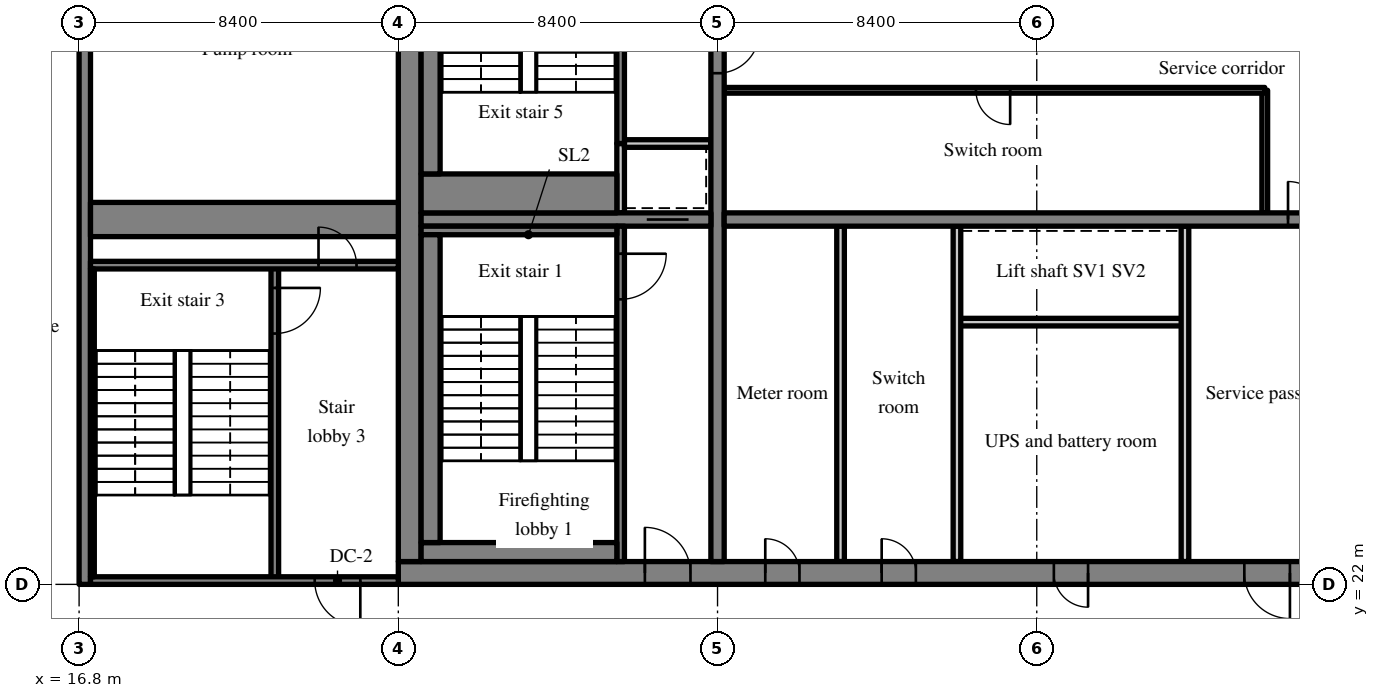
"""IFC4 building model, lengths in metres.
Left out: names, types, materials, properties, quantities, classifications, styles, units other than length and angle.
Written with IfcOpenShell. Run it as: python <this file> out.ifc"""

import sys

from ifc_helpers import new_model, si_unit, direction, frame, frame_2d, origin, place, context, subcontext, project, spatial, rectangle, extrude, source, transform, mapped, element, fill, save


model = new_model("IFC4")
c1 = context("Model", 3, precision=1e-05, world=origin(), true_north=direction((0.0, 1.0)))
c2 = subcontext(c1, "Body", "Model", "MODEL_VIEW")
j1 = project(units=[si_unit("LENGTHUNIT", "METRE"), si_unit("PLANEANGLEUNIT", "RADIAN")], contexts=[c1])
p1 = place(None, origin())
s1 = spatial("IfcSite", under=j1, at=p1, CompositionType="ELEMENT")
p2 = place(p1, origin())
s2 = spatial("IfcBuilding", under=s1, at=p2, CompositionType="ELEMENT")
p3 = place(p2, frame((0.0, 0.0, 264.7)))
s3 = spatial("IfcBuildingStorey", under=s2, at=p3, CompositionType="ELEMENT", Elevation=264.7)
m1 = source(origin(), c2, "Body", "SweptSolid", [
    extrude(rectangle(XDim=50.4, YDim=0.6, at=frame_2d((25.2, 0.0))), origin(), (0.0, 0.0, 1.0), 5.12),
])
p4 = place(p3, frame((25.2, 22.3, 0.0), z_axis=(0.0, 0.0, 1.0), x_axis=(1.0, 0.0, 0.0)))
e1 = element("IfcWall", 1, at=p4, inside=s3, PredefinedType="SHEAR", context=c2, shape_type="MappedRepresentation", body=[
    mapped(m1, transform((0.0, 0.0, 0.0), scale=1.0)),
])
m2 = source(origin(), c2, "Body", "SweptSolid", [
    extrude(rectangle(XDim=1.2, YDim=2.1, at=frame_2d((0.6, 1.05))), frame((0.0, 0.31, 0.0), z_axis=(0.0, -1.0, 0.0), x_axis=(1.0, 0.0, 0.0)), (0.0, 0.0, 1.0), 0.62),
])
p5 = place(p4, frame((22.262, 0.0, 0.0)))
e2 = element("IfcOpeningElement", 2, at=p5, cuts=e1, PredefinedType="OPENING", context=c2, shape_type="MappedRepresentation", body=[
    mapped(m2, transform((0.0, 0.0, 0.0), scale=1.0)),
])
m3 = source(origin(), c2, "Body", "SweptSolid", [
    extrude(rectangle(XDim=0.9, YDim=2.1, at=frame_2d((0.45, 1.05))), frame((0.0, 0.31, 0.0), z_axis=(0.0, -1.0, 0.0), x_axis=(1.0, 0.0, 0.0)), (0.0, 0.0, 1.0), 0.62),
])
p6 = place(p4, frame((17.25, 0.0, 0.0)))
e3 = element("IfcOpeningElement", 3, at=p6, cuts=e1, PredefinedType="OPENING", context=c2, shape_type="MappedRepresentation", body=[
    mapped(m3, transform((0.0, 0.0, 0.0), scale=1.0)),
])
p7 = place(p4, frame((9.656, 0.0, 0.0)))
e4 = element("IfcOpeningElement", 4, at=p7, cuts=e1, PredefinedType="OPENING", context=c2, shape_type="MappedRepresentation", body=[
    mapped(m3, transform((0.0, 0.0, 0.0), scale=1.0)),
])
p8 = place(p4, frame((12.719, 0.0, 0.0)))
e5 = element("IfcOpeningElement", 5, at=p8, cuts=e1, PredefinedType="OPENING", context=c2, shape_type="MappedRepresentation", body=[
    mapped(m3, transform((0.0, 0.0, 0.0), scale=1.0)),
])
m4 = source(origin(), c2, "Body", "SweptSolid", [
    extrude(rectangle(XDim=1.8, YDim=2.1, at=frame_2d((0.9, 1.05))), frame((0.0, 0.31, 0.0), z_axis=(0.0, -1.0, 0.0), x_axis=(1.0, 0.0, 0.0)), (0.0, 0.0, 1.0), 0.62),
])
p9 = place(p4, frame((32.7, 0.0, 0.0)))
e6 = element("IfcOpeningElement", 6, at=p9, cuts=e1, PredefinedType="OPENING", context=c2, shape_type="MappedRepresentation", body=[
    mapped(m4, transform((0.0, 0.0, 0.0), scale=1.0)),
])
p10 = place(p4, frame((6.488, 0.0, 0.0)))
e7 = element("IfcOpeningElement", 7, at=p10, cuts=e1, PredefinedType="OPENING", context=c2, shape_type="MappedRepresentation", body=[
    mapped(m2, transform((0.0, 0.0, 0.0), scale=1.0)),
])
p11 = place(p4, frame((47.925, 0.0, 0.0)))
e8 = element("IfcOpeningElement", 8, at=p11, cuts=e1, PredefinedType="OPENING", context=c2, shape_type="MappedRepresentation", body=[
    mapped(m2, transform((0.0, 0.0, 0.0), scale=1.0)),
])
m5 = source(origin(), c2, "Body", "SweptSolid", [
    extrude(rectangle(XDim=18.8, YDim=0.6, at=frame_2d((9.4, 0.0))), origin(), (0.0, 0.0, 1.0), 5.12),
])
p12 = place(p3, frame((25.5, 22.6, 0.0), z_axis=(0.0, 0.0, 1.0), x_axis=(0.0, 1.0, 0.0)))
e9 = element("IfcWall", 9, at=p12, inside=s3, PredefinedType="SHEAR", context=c2, shape_type="MappedRepresentation", body=[
    mapped(m5, transform((0.0, 0.0, 0.0), scale=1.0)),
])
p13 = place(p12, frame((16.6, 0.0, 0.0)))
e10 = element("IfcOpeningElement", 10, at=p13, cuts=e9, PredefinedType="OPENING", context=c2, shape_type="MappedRepresentation", body=[
    mapped(m2, transform((0.0, 0.0, 0.0), scale=1.0)),
])
m6 = source(origin(), c2, "Body", "SweptSolid", [
    extrude(rectangle(XDim=18.8, YDim=0.35, at=frame_2d((9.4, 0.0))), origin(), (0.0, 0.0, 1.0), 5.12),
])
p14 = place(p3, frame((33.6, 22.6, 0.0), z_axis=(0.0, 0.0, 1.0), x_axis=(0.0, 1.0, 0.0)))
e11 = element("IfcWall", 11, at=p14, inside=s3, PredefinedType="SHEAR", context=c2, shape_type="MappedRepresentation", body=[
    mapped(m6, transform((0.0, 0.0, 0.0), scale=1.0)),
])
m7 = source(origin(), c2, "Body", "SweptSolid", [
    extrude(rectangle(XDim=1.1, YDim=2.1, at=frame_2d((0.55, 1.05))), frame((0.0, 0.185, 0.0), z_axis=(0.0, -1.0, 0.0), x_axis=(1.0, 0.0, 0.0)), (0.0, 0.0, 1.0), 0.37),
])
p15 = place(p14, frame((12.85, 0.0, 0.0)))
e12 = element("IfcOpeningElement", 12, at=p15, cuts=e11, PredefinedType="OPENING", context=c2, shape_type="MappedRepresentation", body=[
    mapped(m7, transform((0.0, 0.0, 0.0), scale=1.0)),
])
m8 = source(origin(), c2, "Body", "SweptSolid", [
    extrude(rectangle(XDim=7.625, YDim=0.35, at=frame_2d((3.812, 0.0))), origin(), (0.0, 0.0, 1.0), 5.12),
])
p16 = place(p3, frame((25.8, 31.6, 0.0), z_axis=(0.0, 0.0, 1.0), x_axis=(1.0, 0.0, 0.0)))
e13 = element("IfcWall", 13, at=p16, inside=s3, PredefinedType="SHEAR", context=c2, shape_type="MappedRepresentation", body=[
    mapped(m8, transform((0.0, 0.0, 0.0), scale=1.0)),
])
p17 = place(p16, frame((5.938, 0.0, 0.0)))
e14 = element("IfcOpeningElement", 14, at=p17, cuts=e13, PredefinedType="OPENING", context=c2, shape_type="MappedRepresentation", body=[
    mapped(m7, transform((0.0, 0.0, 0.0), scale=1.0)),
])
m9 = source(origin(), c2, "Body", "SweptSolid", [
    extrude(rectangle(XDim=16.45, YDim=0.35, at=frame_2d((8.225, 0.0))), origin(), (0.0, 0.0, 1.0), 5.12),
])
p18 = place(p3, frame((33.775, 31.6, 0.0), z_axis=(0.0, 0.0, 1.0), x_axis=(1.0, 0.0, 0.0)))
e15 = element("IfcWall", 15, at=p18, inside=s3, PredefinedType="SHEAR", context=c2, shape_type="MappedRepresentation", body=[
    mapped(m9, transform((0.0, 0.0, 0.0), scale=1.0)),
])
m10 = source(origin(), c2, "Body", "SweptSolid", [
    extrude(rectangle(XDim=1.0, YDim=2.1, at=frame_2d((0.5, 1.05))), frame((0.0, 0.185, 0.0), z_axis=(0.0, -1.0, 0.0), x_axis=(1.0, 0.0, 0.0)), (0.0, 0.0, 1.0), 0.37),
])
p19 = place(p18, frame((14.837, 0.0, 0.0)))
e16 = element("IfcOpeningElement", 16, at=p19, cuts=e15, PredefinedType="OPENING", context=c2, shape_type="MappedRepresentation", body=[
    mapped(m10, transform((0.0, 0.0, 0.0), scale=1.0)),
])
m11 = source(origin(), c2, "Body", "SweptSolid", [
    extrude(rectangle(XDim=18.4, YDim=0.3, at=frame_2d((9.2, 0.0))), origin(), (0.0, 0.0, 1.0), 5.12),
])
p20 = place(p3, frame((16.95, 22.0, 0.0), z_axis=(0.0, 0.0, 1.0), x_axis=(0.0, 1.0, 0.0)))
e17 = element("IfcWall", 17, at=p20, inside=s3, PredefinedType="SHEAR", context=c2, shape_type="MappedRepresentation", body=[
    mapped(m11, transform((0.0, 0.0, 0.0), scale=1.0)),
])
m12 = source(origin(), c2, "Body", "SweptSolid", [
    extrude(rectangle(XDim=8.1, YDim=0.9, at=frame_2d((4.05, 0.0))), origin(), (0.0, 0.0, 1.0), 5.12),
])
p21 = place(p3, frame((17.1, 31.6, 0.0), z_axis=(0.0, 0.0, 1.0), x_axis=(1.0, 0.0, 0.0)))
e18 = element("IfcWall", 18, at=p21, inside=s3, PredefinedType="SHEAR", context=c2, shape_type="MappedRepresentation", body=[
    mapped(m12, transform((0.0, 0.0, 0.0), scale=1.0)),
])
m13 = source(origin(), c2, "Body", "SweptSolid", [
    extrude(rectangle(XDim=6.0, YDim=0.2, at=frame_2d((3.0, 0.0))), origin(), (0.0, 0.0, 1.0), 5.12),
])
p22 = place(p3, frame((39.9, 28.9, 0.0), z_axis=(0.0, 0.0, 1.0), x_axis=(1.0, 0.0, 0.0)))
e19 = element("IfcWall", 19, at=p22, inside=s3, PredefinedType="SOLIDWALL", context=c2, shape_type="MappedRepresentation", body=[
    mapped(m13, transform((0.0, 0.0, 0.0), scale=1.0)),
])
m14 = source(origin(), c2, "Body", "SweptSolid", [
    extrude(rectangle(XDim=8.825, YDim=0.2, at=frame_2d((4.413, 0.0))), origin(), (0.0, 0.0, 1.0), 5.12),
])
for number, where, z_axis, x_axis in (
    (20, (45.9, 22.6, 0.0), (0.0, 0.0, 1.0), (0.0, 1.0, 0.0)),
    (21, (39.9, 22.6, 0.0), (0.0, 0.0, 1.0), (0.0, 1.0, 0.0)),
    (22, (36.837, 22.6, 0.0), (0.0, 0.0, 1.0), (0.0, 1.0, 0.0)),
):
    element("IfcWall", number, at=place(p3, frame(where, z_axis=z_axis, x_axis=x_axis)), inside=s3, PredefinedType="PARTITIONING", context=c2, shape_type="MappedRepresentation", body=[
        mapped(m14, transform((0.0, 0.0, 0.0), scale=1.0)),
    ])
m15 = source(origin(), c2, "Body", "SweptSolid", [
    extrude(rectangle(XDim=3.225, YDim=0.15, at=frame_2d((1.613, 0.0))), origin(), (0.0, 0.0, 1.0), 5.12),
])
p23 = place(p3, frame((48.0, 31.775, 0.0), z_axis=(0.0, 0.0, 1.0), x_axis=(0.0, 1.0, 0.0)))
e23 = element("IfcWall", 23, at=p23, inside=s3, PredefinedType="PARTITIONING", context=c2, shape_type="MappedRepresentation", body=[
    mapped(m15, transform((0.0, 0.0, 0.0), scale=1.0)),
])
m16 = source(origin(), c2, "Body", "SweptSolid", [
    extrude(rectangle(XDim=14.225, YDim=0.15, at=frame_2d((7.113, 0.0))), origin(), (0.0, 0.0, 1.0), 5.12),
])
p24 = place(p3, frame((33.775, 35.0, 0.0), z_axis=(0.0, 0.0, 1.0), x_axis=(1.0, 0.0, 0.0)))
e24 = element("IfcWall", 24, at=p24, inside=s3, PredefinedType="PARTITIONING", context=c2, shape_type="MappedRepresentation", body=[
    mapped(m16, transform((0.0, 0.0, 0.0), scale=1.0)),
])
m17 = source(origin(), c2, "Body", "SweptSolid", [
    extrude(rectangle(XDim=0.9, YDim=2.1, at=frame_2d((0.45, 1.05))), frame((0.0, 0.085, 0.0), z_axis=(0.0, -1.0, 0.0), x_axis=(1.0, 0.0, 0.0)), (0.0, 0.0, 1.0), 0.17),
])
p25 = place(p24, frame((6.625, 0.0, 0.0)))
e25 = element("IfcOpeningElement", 25, at=p25, cuts=e24, PredefinedType="OPENING", context=c2, shape_type="MappedRepresentation", body=[
    mapped(m17, transform((0.0, 0.0, 0.0), scale=1.0)),
])
m18 = source(origin(), c2, "Body", "SweptSolid", [
    extrude(rectangle(XDim=8.825, YDim=0.2, at=frame_2d((4.413, 0.0))), origin(), (0.0, 0.0, 1.0), 5.12),
])
p26 = place(p3, frame((31.05, 22.6, 0.0), z_axis=(0.0, 0.0, 1.0), x_axis=(0.0, 1.0, 0.0)))
e26 = element("IfcWall", 26, at=p26, inside=s3, PredefinedType="SOLIDWALL", context=c2, shape_type="MappedRepresentation", body=[
    mapped(m18, transform((0.0, 0.0, 0.0), scale=1.0)),
])
m19 = source(origin(), c2, "Body", "SweptSolid", [
    extrude(rectangle(XDim=1.2, YDim=2.1, at=frame_2d((0.6, 1.05))), frame((0.0, 0.11, 0.0), z_axis=(0.0, -1.0, 0.0), x_axis=(1.0, 0.0, 0.0)), (0.0, 0.0, 1.0), 0.22),
])
p27 = place(p26, frame((6.9, 0.0, 0.0)))
e27 = element("IfcOpeningElement", 27, at=p27, cuts=e26, PredefinedType="OPENING", context=c2, shape_type="MappedRepresentation", body=[
    mapped(m19, transform((0.0, 0.0, 0.0), scale=1.0)),
])
m20 = source(origin(), c2, "Body", "SweptSolid", [
    extrude(rectangle(XDim=1.825, YDim=0.2, at=frame_2d((0.913, 0.0))), origin(), (0.0, 0.0, 1.0), 5.12),
])
p28 = place(p3, frame((31.05, 31.775, 0.0), z_axis=(0.0, 0.0, 1.0), x_axis=(0.0, 1.0, 0.0)))
e28 = element("IfcWall", 28, at=p28, inside=s3, PredefinedType="SOLIDWALL", context=c2, shape_type="MappedRepresentation", body=[
    mapped(m20, transform((0.0, 0.0, 0.0), scale=1.0)),
])
m21 = source(origin(), c2, "Body", "SweptSolid", [
    extrude(rectangle(XDim=2.275, YDim=0.2, at=frame_2d((1.138, 0.0))), origin(), (0.0, 0.0, 1.0), 5.12),
])
p29 = place(p3, frame((31.15, 33.6, 0.0), z_axis=(0.0, 0.0, 1.0), x_axis=(1.0, 0.0, 0.0)))
e29 = element("IfcWall", 29, at=p29, inside=s3, PredefinedType="SOLIDWALL", context=c2, shape_type="MappedRepresentation", body=[
    mapped(m21, transform((0.0, 0.0, 0.0), scale=1.0)),
])
m22 = source(origin(), c2, "Body", "SweptSolid", [
    extrude(rectangle(XDim=7.8, YDim=0.2, at=frame_2d((3.9, 0.0))), origin(), (0.0, 0.0, 1.0), 5.12),
])
p30 = place(p3, frame((31.05, 33.6, 0.0), z_axis=(0.0, 0.0, 1.0), x_axis=(0.0, 1.0, 0.0)))
e30 = element("IfcWall", 30, at=p30, inside=s3, PredefinedType="SOLIDWALL", context=c2, shape_type="MappedRepresentation", body=[
    mapped(m22, transform((0.0, 0.0, 0.0), scale=1.0)),
])
m23 = source(origin(), c2, "Body", "SweptSolid", [
    extrude(rectangle(XDim=1.8, YDim=2.1, at=frame_2d((0.9, 1.05))), frame((0.0, 0.11, 0.0), z_axis=(0.0, -1.0, 0.0), x_axis=(1.0, 0.0, 0.0)), (0.0, 0.0, 1.0), 0.22),
])
p31 = place(p30, frame((5.3, 0.0, 0.0)))
e31 = element("IfcOpeningElement", 31, at=p31, cuts=e30, PredefinedType="OPENING", context=c2, shape_type="MappedRepresentation", body=[
    mapped(m23, transform((0.0, 0.0, 0.0), scale=1.0)),
])
m24 = source(origin(), c2, "Body", "SweptSolid", [
    extrude(rectangle(XDim=8.3, YDim=0.2, at=frame_2d((4.15, 0.0))), origin(), (0.0, 0.0, 1.0), 5.12),
])
p32 = place(p3, frame((21.95, 22.1, 0.0), z_axis=(0.0, 0.0, 1.0), x_axis=(0.0, 1.0, 0.0)))
e32 = element("IfcWall", 32, at=p32, inside=s3, PredefinedType="SOLIDWALL", context=c2, shape_type="MappedRepresentation", body=[
    mapped(m24, transform((0.0, 0.0, 0.0), scale=1.0)),
])
p33 = place(p32, frame((6.5, 0.0, 0.0)))
e33 = element("IfcOpeningElement", 33, at=p33, cuts=e32, PredefinedType="OPENING", context=c2, shape_type="MappedRepresentation", body=[
    mapped(m19, transform((0.0, 0.0, 0.0), scale=1.0)),
])
m25 = source(origin(), c2, "Body", "SweptSolid", [
    extrude(rectangle(XDim=8.1, YDim=0.2, at=frame_2d((4.05, 0.0))), origin(), (0.0, 0.0, 1.0), 5.12),
])
p34 = place(p3, frame((17.1, 22.1, 0.0), z_axis=(0.0, 0.0, 1.0), x_axis=(1.0, 0.0, 0.0)))
e34 = element("IfcWall", 34, at=p34, inside=s3, PredefinedType="SOLIDWALL", context=c2, shape_type="MappedRepresentation", body=[
    mapped(m25, transform((0.0, 0.0, 0.0), scale=1.0)),
])
p35 = place(p34, frame((5.9, 0.0, 0.0)))
e35 = element("IfcOpeningElement", 35, at=p35, cuts=e34, PredefinedType="OPENING", context=c2, shape_type="MappedRepresentation", body=[
    mapped(m19, transform((0.0, 0.0, 0.0), scale=1.0)),
])
p36 = place(p3, frame((25.2, 30.4, 0.0), z_axis=(0.0, 0.0, 1.0), x_axis=(-1.0, 0.0, 0.0)))
e36 = element("IfcWall", 36, at=p36, inside=s3, PredefinedType="SOLIDWALL", context=c2, shape_type="MappedRepresentation", body=[
    mapped(m25, transform((0.0, 0.0, 0.0), scale=1.0)),
])
m26 = source(origin(), c2, "Body", "SweptSolid", [
    extrude(rectangle(XDim=1.0, YDim=2.1, at=frame_2d((0.5, 1.05))), frame((0.0, 0.11, 0.0), z_axis=(0.0, -1.0, 0.0), x_axis=(1.0, 0.0, 0.0)), (0.0, 0.0, 1.0), 0.22),
])
p37 = place(p36, frame((1.1, 0.0, 0.0)))
e37 = element("IfcOpeningElement", 37, at=p37, cuts=e36, PredefinedType="OPENING", context=c2, shape_type="MappedRepresentation", body=[
    mapped(m26, transform((0.0, 0.0, 0.0), scale=1.0)),
])
m27 = source(origin(), c2, "Body", "SweptSolid", [
    extrude(rectangle(XDim=5.15, YDim=0.5, at=frame_2d((2.575, 0.0))), origin(), (0.0, 0.0, 1.0), 5.12),
])
p38 = place(p3, frame((25.8, 22.85, 0.0), z_axis=(0.0, 0.0, 1.0), x_axis=(1.0, 0.0, 0.0)))
e38 = element("IfcWall", 38, at=p38, inside=s3, PredefinedType="SOLIDWALL", context=c2, shape_type="MappedRepresentation", body=[
    mapped(m27, transform((0.0, 0.0, 0.0), scale=1.0)),
])
m28 = source(origin(), c2, "Body", "SweptSolid", [
    extrude(rectangle(XDim=5.15, YDim=0.225, at=frame_2d((2.575, 0.0))), origin(), (0.0, 0.0, 1.0), 5.12),
])
p39 = place(p3, frame((25.8, 31.312, 0.0), z_axis=(0.0, 0.0, 1.0), x_axis=(1.0, 0.0, 0.0)))
e39 = element("IfcWall", 39, at=p39, inside=s3, PredefinedType="SOLIDWALL", context=c2, shape_type="MappedRepresentation", body=[
    mapped(m28, transform((0.0, 0.0, 0.0), scale=1.0)),
])
m29 = source(origin(), c2, "Body", "SweptSolid", [
    extrude(rectangle(XDim=8.1, YDim=0.5, at=frame_2d((4.05, 0.0))), origin(), (0.0, 0.0, 1.0), 5.12),
])
p40 = place(p3, frame((26.05, 23.1, 0.0), z_axis=(0.0, 0.0, 1.0), x_axis=(0.0, 1.0, 0.0)))
e40 = element("IfcWall", 40, at=p40, inside=s3, PredefinedType="SOLIDWALL", context=c2, shape_type="MappedRepresentation", body=[
    mapped(m29, transform((0.0, 0.0, 0.0), scale=1.0)),
])
m30 = source(origin(), c2, "Body", "SweptSolid", [
    extrude(rectangle(XDim=8.1, YDim=0.1, at=frame_2d((4.05, 0.0))), origin(), (0.0, 0.0, 1.0), 5.12),
])
p41 = place(p3, frame((17.15, 22.2, 0.0), z_axis=(0.0, 0.0, 1.0), x_axis=(0.0, 1.0, 0.0)))
e41 = element("IfcWall", 41, at=p41, inside=s3, PredefinedType="SOLIDWALL", context=c2, shape_type="MappedRepresentation", body=[
    mapped(m30, transform((0.0, 0.0, 0.0), scale=1.0)),
])
m31 = source(origin(), c2, "Body", "SweptSolid", [
    extrude(rectangle(XDim=5.15, YDim=1.025, at=frame_2d((2.575, 0.0))), origin(), (0.0, 0.0, 1.0), 5.12),
])
p42 = place(p3, frame((25.8, 32.287, 0.0), z_axis=(0.0, 0.0, 1.0), x_axis=(1.0, 0.0, 0.0)))
e42 = element("IfcWall", 42, at=p42, inside=s3, PredefinedType="SOLIDWALL", context=c2, shape_type="MappedRepresentation", body=[
    mapped(m31, transform((0.0, 0.0, 0.0), scale=1.0)),
])
m32 = source(origin(), c2, "Body", "SweptSolid", [
    extrude(rectangle(XDim=6.3, YDim=0.5, at=frame_2d((3.15, 0.0))), origin(), (0.0, 0.0, 1.0), 5.12),
])
p43 = place(p3, frame((26.05, 32.8, 0.0), z_axis=(0.0, 0.0, 1.0), x_axis=(0.0, 1.0, 0.0)))
e43 = element("IfcWall", 43, at=p43, inside=s3, PredefinedType="SOLIDWALL", context=c2, shape_type="MappedRepresentation", body=[
    mapped(m32, transform((0.0, 0.0, 0.0), scale=1.0)),
])
m33 = source(origin(), c2, "Body", "SweptSolid", [
    extrude(rectangle(XDim=1.2, YDim=2.1, at=frame_2d((0.6, 1.05))), frame((0.0, 0.225, 0.0), z_axis=(0.0, -1.0, 0.0), x_axis=(1.0, 0.0, 0.0)), (0.0, 0.0, 1.0), 0.05),
])
p44 = place(p5, origin())
e44 = element("IfcDoor", 44, at=p44, inside=s3, OperationType="SINGLE_SWING_RIGHT", PredefinedType="DOOR", context=c2, shape_type="MappedRepresentation", body=[
    mapped(m33, transform((0.0, 0.0, 0.0), scale=1.0)),
])
fill(e2, e44)
m34 = source(origin(), c2, "Body", "SweptSolid", [
    extrude(rectangle(XDim=1.0, YDim=2.1, at=frame_2d((0.5, 1.05))), frame((0.0, 0.025, 0.0), z_axis=(0.0, -1.0, 0.0), x_axis=(1.0, 0.0, 0.0)), (0.0, 0.0, 1.0), 0.05),
])
p45 = place(p19, origin())
e45 = element("IfcDoor", 45, at=p45, inside=s3, OperationType="SINGLE_SWING_LEFT", PredefinedType="DOOR", context=c2, shape_type="MappedRepresentation", body=[
    mapped(m34, transform((0.0, 0.0, 0.0), scale=1.0)),
])
fill(e16, e45)
m35 = source(origin(), c2, "Body", "SweptSolid", [
    extrude(rectangle(XDim=0.9, YDim=2.1, at=frame_2d((0.45, 1.05))), frame((0.0, 0.225, 0.0), z_axis=(0.0, -1.0, 0.0), x_axis=(1.0, 0.0, 0.0)), (0.0, 0.0, 1.0), 0.05),
])
p46 = place(p6, origin())
e46 = element("IfcDoor", 46, at=p46, inside=s3, OperationType="SINGLE_SWING_RIGHT", PredefinedType="DOOR", context=c2, shape_type="MappedRepresentation", body=[
    mapped(m35, transform((0.0, 0.0, 0.0), scale=1.0)),
])
fill(e3, e46)
p47 = place(p7, origin())
e47 = element("IfcDoor", 47, at=p47, inside=s3, OperationType="SINGLE_SWING_LEFT", PredefinedType="DOOR", context=c2, shape_type="MappedRepresentation", body=[
    mapped(m35, transform((0.0, 0.0, 0.0), scale=1.0)),
])
fill(e4, e47)
p48 = place(p8, origin())
e48 = element("IfcDoor", 48, at=p48, inside=s3, OperationType="SINGLE_SWING_LEFT", PredefinedType="DOOR", context=c2, shape_type="MappedRepresentation", body=[
    mapped(m35, transform((0.0, 0.0, 0.0), scale=1.0)),
])
fill(e5, e48)
m36 = source(origin(), c2, "Body", "SweptSolid", [
    extrude(rectangle(XDim=0.9, YDim=2.1, at=frame_2d((0.45, 1.05))), frame((0.0, 0.025, 0.0), z_axis=(0.0, -1.0, 0.0), x_axis=(1.0, 0.0, 0.0)), (0.0, 0.0, 1.0), 0.05),
])
p49 = place(p25, origin())
e49 = element("IfcDoor", 49, at=p49, inside=s3, OperationType="SINGLE_SWING_RIGHT", PredefinedType="DOOR", context=c2, shape_type="MappedRepresentation", body=[
    mapped(m36, transform((0.0, 0.0, 0.0), scale=1.0)),
])
fill(e25, e49)
m37 = source(origin(), c2, "Body", "SweptSolid", [
    extrude(rectangle(XDim=1.2, YDim=2.1, at=frame_2d((0.6, 1.05))), frame((0.0, 0.025, 0.0), z_axis=(0.0, -1.0, 0.0), x_axis=(1.0, 0.0, 0.0)), (0.0, 0.0, 1.0), 0.05),
])
p50 = place(p27, origin())
e50 = element("IfcDoor", 50, at=p50, inside=s3, OperationType="SINGLE_SWING_RIGHT", PredefinedType="DOOR", context=c2, shape_type="MappedRepresentation", body=[
    mapped(m37, transform((0.0, 0.0, 0.0), scale=1.0)),
])
fill(e27, e50)
p51 = place(p10, origin())
e51 = element("IfcDoor", 51, at=p51, inside=s3, OperationType="SINGLE_SWING_LEFT", PredefinedType="DOOR", context=c2, shape_type="MappedRepresentation", body=[
    mapped(m33, transform((0.0, 0.0, 0.0), scale=1.0)),
])
fill(e7, e51)
m38 = source(origin(), c2, "Body", "SweptSolid", [
    extrude(rectangle(XDim=1.1, YDim=2.1, at=frame_2d((0.55, 1.05))), frame((0.0, 0.025, 0.0), z_axis=(0.0, -1.0, 0.0), x_axis=(1.0, 0.0, 0.0)), (0.0, 0.0, 1.0), 0.05),
])
p52 = place(p17, origin())
e52 = element("IfcDoor", 52, at=p52, inside=s3, OperationType="SLIDING_TO_LEFT", PredefinedType="DOOR", context=c2, shape_type="MappedRepresentation", body=[
    mapped(m38, transform((0.0, 0.0, 0.0), scale=1.0)),
])
fill(e14, e52)
p53 = place(p33, origin())
e53 = element("IfcDoor", 53, at=p53, inside=s3, OperationType="SINGLE_SWING_RIGHT", PredefinedType="DOOR", context=c2, shape_type="MappedRepresentation", body=[
    mapped(m37, transform((0.0, 0.0, 0.0), scale=1.0)),
])
fill(e33, e53)
p54 = place(p35, origin())
e54 = element("IfcDoor", 54, at=p54, inside=s3, OperationType="SINGLE_SWING_RIGHT", PredefinedType="DOOR", context=c2, shape_type="MappedRepresentation", body=[
    mapped(m37, transform((0.0, 0.0, 0.0), scale=1.0)),
])
fill(e35, e54)
p55 = place(p37, origin())
e55 = element("IfcDoor", 55, at=p55, inside=s3, OperationType="SINGLE_SWING_RIGHT", PredefinedType="DOOR", context=c2, shape_type="MappedRepresentation", body=[
    mapped(m34, transform((0.0, 0.0, 0.0), scale=1.0)),
])
fill(e37, e55)
p56 = place(p15, origin())
e56 = element("IfcDoor", 56, at=p56, inside=s3, OperationType="SINGLE_SWING_RIGHT", PredefinedType="DOOR", context=c2, shape_type="MappedRepresentation", body=[
    mapped(m38, transform((0.0, 0.0, 0.0), scale=1.0)),
])
fill(e12, e56)
save(model, sys.argv[1])
